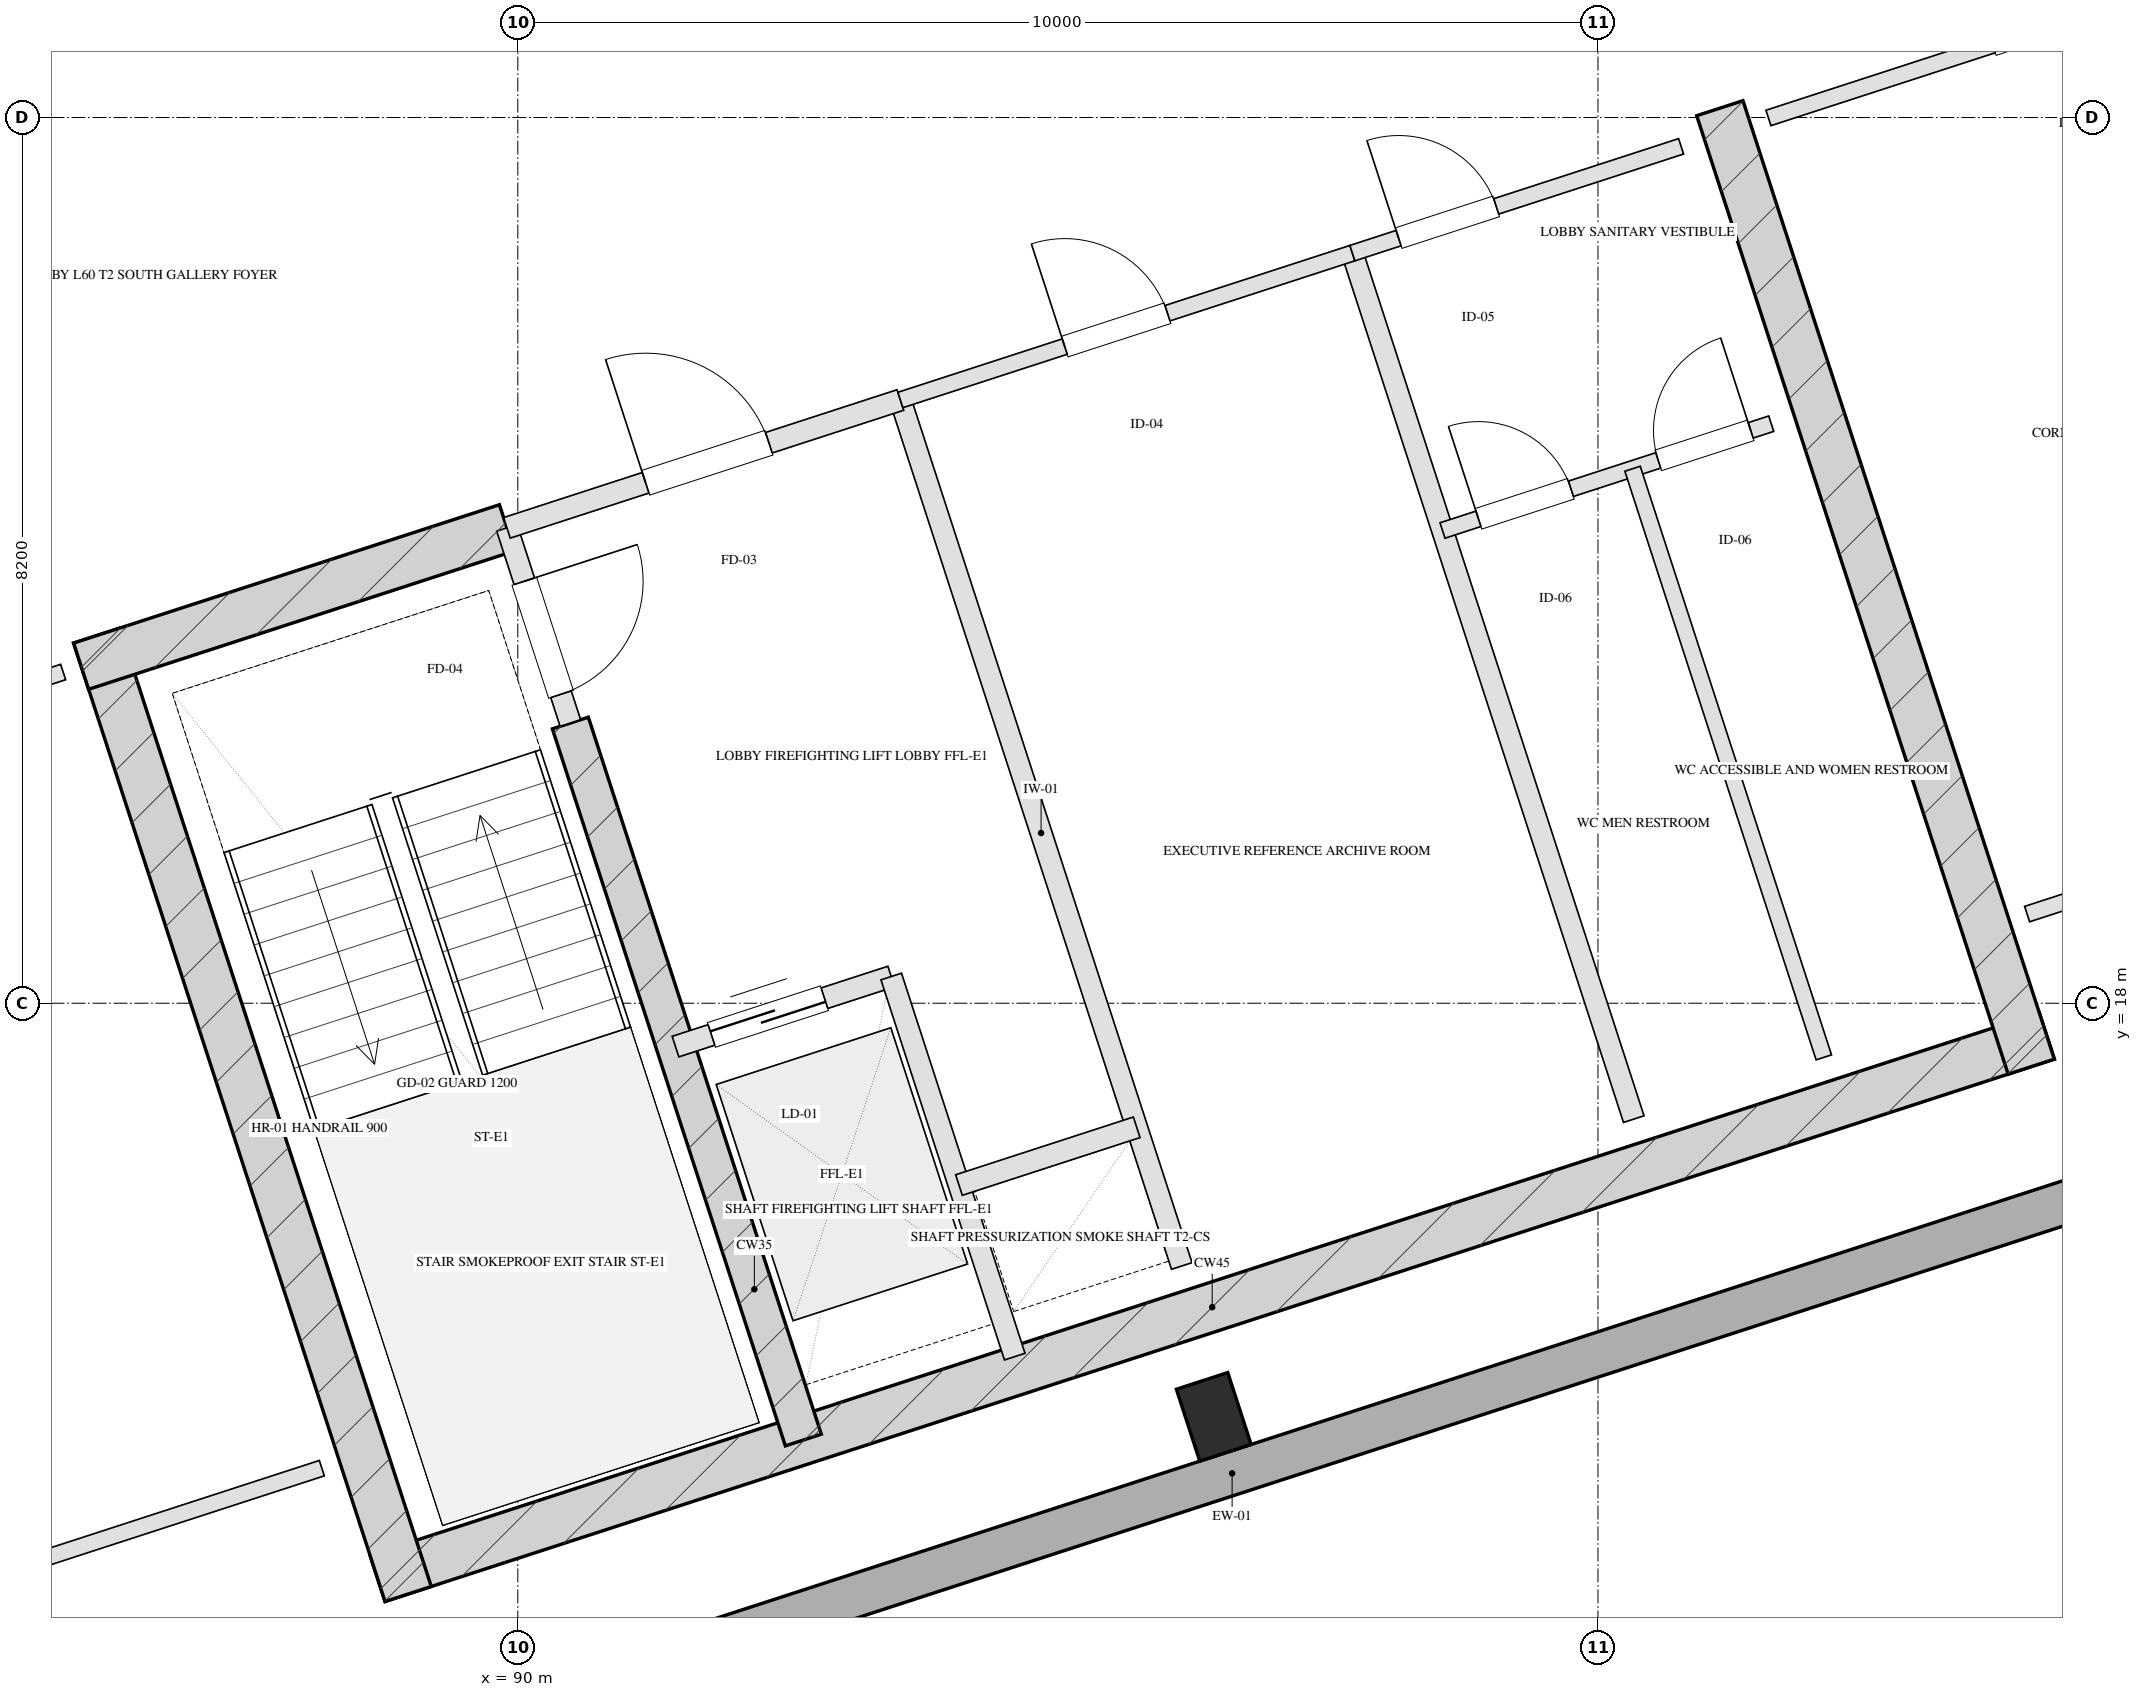
"""IFC4 building model, lengths in metres.
Left out: names, types, materials, properties, quantities, classifications, styles, units other than length and angle.
Written with IfcOpenShell. Run it as: python <this file> out.ifc"""

import sys

from ifc_helpers import new_model, si_unit, direction, frame, frame_2d, origin, origin_2d, place, context, subcontext, project, spatial, rectangle, hollow_rectangle, extrude, element, fill, save


model = new_model("IFC4")
c1 = context("Model", 3, precision=1e-05, world=origin(), true_north=direction((0.0, 1.0)))
c2 = subcontext(c1, "Body", "Model", "MODEL_VIEW")
j1 = project(units=[si_unit("LENGTHUNIT", "METRE"), si_unit("PLANEANGLEUNIT", "RADIAN")], contexts=[c1])
p1 = place(None, origin())
s1 = spatial("IfcSite", under=j1, at=p1, CompositionType="ELEMENT")
p2 = place(p1, origin())
s2 = spatial("IfcBuilding", under=s1, at=p2, CompositionType="ELEMENT")
p3 = place(p2, frame((0.0, 0.0, 223.1)))
s3 = spatial("IfcBuildingStorey", under=s2, at=p3, CompositionType="ELEMENT", Elevation=223.1)
p4 = place(p3, frame((88.701, 12.675, 0.0), z_axis=(0.0, 0.0, 1.0), x_axis=(0.95105824505, 0.309011673763, 0.0)))
e1 = element("IfcWall", 1, at=p4, inside=s3, PredefinedType="SHEAR", context=c2, shape_type="SweptSolid", body=[
    extrude(rectangle(XDim=16.25, YDim=0.45, at=frame_2d((8.125, 0.0))), origin(), (0.0, 0.0, 1.0), 3.45),
])
for number, where, z_axis, x_axis in (
    (2, (86.102, 21.404, 0.0), (0.0, 0.0, 1.0), (0.309, -0.951, 0.0)),
    (3, (101.128, 26.286, 0.0), (0.0, 0.0, 1.0), (0.309, -0.951, 0.0)),
):
    element("IfcWall", number, at=place(p3, frame(where, z_axis=z_axis, x_axis=x_axis)), inside=s3, PredefinedType="SHEAR", context=c2, shape_type="SweptSolid", body=[
        extrude(rectangle(XDim=9.33, YDim=0.45, at=frame_2d((4.665, 0.0))), origin(), (0.0, 0.0, 1.0), 3.45),
    ])
p5 = place(p3, frame((90.486, 20.594, 0.0), z_axis=(0.0, 0.0, 1.0), x_axis=(0.309020428229, -0.951055400562, 0.0)))
e4 = element("IfcWall", 4, at=p5, inside=s3, PredefinedType="SHEAR", context=c2, shape_type="SweptSolid", body=[
    extrude(rectangle(XDim=6.98, YDim=0.35, at=frame_2d((3.49, 0.0))), origin(), (0.0, 0.0, 1.0), 3.45),
])
p6 = place(p3, frame((85.957, 21.12, 0.0), z_axis=(0.0, 0.0, 1.0), x_axis=(0.951064796122, 0.308991510526, 0.0)))
e5 = element("IfcWall", 5, at=p6, inside=s3, PredefinedType="SHEAR", context=c2, shape_type="SweptSolid", body=[
    extrude(rectangle(XDim=4.145, YDim=0.45, at=frame_2d((2.073, 0.0))), origin(), (0.0, 0.0, 1.0), 3.45),
])
p7 = place(p3, frame((96.443, 14.17, 0.0), z_axis=(0.0, 0.0, 1.0), x_axis=(0.951056516295, 0.309016994375, 0.0)))
e6 = element("IfcColumn", 6, at=p7, inside=s3, PredefinedType="COLUMN", context=c2, shape_type="SweptSolid", body=[
    extrude(hollow_rectangle(XDim=0.5, YDim=0.7, WallThickness=0.025, at=origin_2d()), origin(), (0.0, 0.0, 1.0), 3.451),
])
p8 = place(p3, frame((97.382, 56.586, 0.0), z_axis=(0.0, 0.0, 1.0), x_axis=(0.309016491071, -0.951056679828, 0.0)))
e7 = element("IfcWall", 7, at=p8, inside=s3, PredefinedType="SOLIDWALL", context=c2, shape_type="SweptSolid", body=[
    extrude(rectangle(XDim=38.4, YDim=0.4, at=frame_2d((19.2, 0.0))), origin(), (0.0, 0.0, 1.0), 2.61),
])
p9 = place(p8, frame((24.55, 0.0, 0.75)))
e8 = element("IfcOpeningElement", 8, at=p9, cuts=e7, PredefinedType="OPENING", context=c2, shape_type="SweptSolid", body=[
    extrude(rectangle(XDim=2.1, YDim=1.46, at=frame_2d((1.05, 0.73))), frame((0.0, 0.21, 0.0), z_axis=(0.0, -1.0, 0.0), x_axis=(1.0, 0.0, 0.0)), (0.0, 0.0, 1.0), 0.42),
])
p10 = place(p8, frame((20.75, 0.0, 0.75)))
e9 = element("IfcOpeningElement", 9, at=p10, cuts=e7, PredefinedType="OPENING", context=c2, shape_type="SweptSolid", body=[
    extrude(rectangle(XDim=2.1, YDim=1.46, at=frame_2d((1.05, 0.73))), frame((0.0, 0.21, 0.0), z_axis=(0.0, -1.0, 0.0), x_axis=(1.0, 0.0, 0.0)), (0.0, 0.0, 1.0), 0.42),
])
p11 = place(p8, frame((15.55, 0.0, 0.75)))
e10 = element("IfcOpeningElement", 10, at=p11, cuts=e7, PredefinedType="OPENING", context=c2, shape_type="SweptSolid", body=[
    extrude(rectangle(XDim=2.1, YDim=1.46, at=frame_2d((1.05, 0.73))), frame((0.0, 0.21, 0.0), z_axis=(0.0, -1.0, 0.0), x_axis=(1.0, 0.0, 0.0)), (0.0, 0.0, 1.0), 0.42),
])
p12 = place(p8, frame((11.75, 0.0, 0.75)))
e11 = element("IfcOpeningElement", 11, at=p12, cuts=e7, PredefinedType="OPENING", context=c2, shape_type="SweptSolid", body=[
    extrude(rectangle(XDim=2.1, YDim=1.46, at=frame_2d((1.05, 0.73))), frame((0.0, 0.21, 0.0), z_axis=(0.0, -1.0, 0.0), x_axis=(1.0, 0.0, 0.0)), (0.0, 0.0, 1.0), 0.42),
])
p13 = place(p3, frame((107.835, 17.294, 0.0), z_axis=(0.0, 0.0, 1.0), x_axis=(-0.951058012937, -0.309012388148, 0.0)))
e12 = element("IfcWall", 12, at=p13, inside=s3, PredefinedType="SOLIDWALL", context=c2, shape_type="SweptSolid", body=[
    extrude(rectangle(XDim=23.6, YDim=0.4, at=frame_2d((11.8, 0.0))), origin(), (0.0, 0.0, 1.0), 2.61),
])
p14 = place(p3, frame((89.899, 22.401, 0.0), z_axis=(0.0, 0.0, 1.0), x_axis=(0.308932062672, -0.951084108086, 0.0)))
e13 = element("IfcWall", 13, at=p14, inside=s3, PredefinedType="PARTITIONING", context=c2, shape_type="SweptSolid", body=[
    extrude(rectangle(XDim=1.9, YDim=0.2, at=frame_2d((0.95, 0.0))), origin(), (0.0, 0.0, 1.0), 3.175),
])
p15 = place(p14, frame((0.52, 0.0, 0.0)))
e14 = element("IfcOpeningElement", 14, at=p15, cuts=e13, PredefinedType="OPENING", context=c2, shape_type="SweptSolid", body=[
    extrude(rectangle(XDim=1.1, YDim=2.05, at=frame_2d((0.55, 1.025))), frame((0.0, 0.11, 0.0), z_axis=(0.0, -1.0, 0.0), x_axis=(1.0, 0.0, 0.0)), (0.0, 0.0, 1.0), 0.22),
])
p16 = place(p3, frame((93.542, 23.585, 0.0), z_axis=(0.0, 0.0, 1.0), x_axis=(0.309042196757, -0.951048327176, 0.0)))
e15 = element("IfcWall", 15, at=p16, inside=s3, PredefinedType="PARTITIONING", context=c2, shape_type="SweptSolid", body=[
    extrude(rectangle(XDim=8.43, YDim=0.2, at=frame_2d((4.215, 0.0))), origin(), (0.0, 0.0, 1.0), 3.175),
])
p17 = place(p3, frame((89.899, 22.401, 0.0), z_axis=(0.0, 0.0, 1.0), x_axis=(0.951046716504, 0.309047153403, 0.0)))
e16 = element("IfcWall", 16, at=p17, inside=s3, PredefinedType="PARTITIONING", context=c2, shape_type="SweptSolid", body=[
    extrude(rectangle(XDim=3.83, YDim=0.2, at=frame_2d((1.915, 0.0))), origin(), (0.0, 0.0, 1.0), 3.175),
])
p18 = place(p17, frame((1.35, 0.0, 0.0)))
e17 = element("IfcOpeningElement", 17, at=p18, cuts=e16, PredefinedType="OPENING", context=c2, shape_type="SweptSolid", body=[
    extrude(rectangle(XDim=1.2, YDim=2.05, at=frame_2d((0.6, 1.025))), frame((0.0, 0.11, 0.0), z_axis=(0.0, -1.0, 0.0), x_axis=(1.0, 0.0, 0.0)), (0.0, 0.0, 1.0), 0.22),
])
p19 = place(p3, frame((91.46, 17.598, 0.0), z_axis=(0.0, 0.0, 1.0), x_axis=(0.951062257173, 0.308999325213, 0.0)))
e18 = element("IfcWall", 18, at=p19, inside=s3, PredefinedType="PARTITIONING", context=c2, shape_type="SweptSolid", body=[
    extrude(rectangle(XDim=2.1, YDim=0.2, at=frame_2d((1.05, 0.0))), origin(), (0.0, 0.0, 1.0), 3.175),
])
p20 = place(p19, frame((0.35, 0.0, 0.0)))
e19 = element("IfcOpeningElement", 19, at=p20, cuts=e18, PredefinedType="OPENING", context=c2, shape_type="SweptSolid", body=[
    extrude(rectangle(XDim=1.1, YDim=2.05, at=frame_2d((0.55, 1.025))), frame((0.0, 0.11, 0.0), z_axis=(0.0, -1.0, 0.0), x_axis=(1.0, 0.0, 0.0)), (0.0, 0.0, 1.0), 0.22),
])
p21 = place(p3, frame((93.457, 18.247, 0.0), z_axis=(0.0, 0.0, 1.0), x_axis=(0.3089935693, -0.951064127245, 0.0)))
e20 = element("IfcWall", 20, at=p21, inside=s3, PredefinedType="PARTITIONING", context=c2, shape_type="SweptSolid", body=[
    extrude(rectangle(XDim=3.7, YDim=0.2, at=frame_2d((1.85, 0.0))), origin(), (0.0, 0.0, 1.0), 3.175),
])
p22 = place(p3, frame((94.084, 16.317, 0.0), z_axis=(0.0, 0.0, 1.0), x_axis=(0.951041328149, 0.309063734775, 0.0)))
e21 = element("IfcWall", 21, at=p22, inside=s3, PredefinedType="PARTITIONING", context=c2, shape_type="SweptSolid", body=[
    extrude(rectangle(XDim=1.73, YDim=0.2, at=frame_2d((0.865, 0.0))), origin(), (0.0, 0.0, 1.0), 3.175),
])
p23 = place(p3, frame((97.727, 24.944, 0.0), z_axis=(0.0, 0.0, 1.0), x_axis=(0.309016001439, -0.951056838919, 0.0)))
e22 = element("IfcWall", 22, at=p23, inside=s3, PredefinedType="PARTITIONING", context=c2, shape_type="SweptSolid", body=[
    extrude(rectangle(XDim=8.43, YDim=0.2, at=frame_2d((4.215, 0.0))), origin(), (0.0, 0.0, 1.0), 3.175),
])
p24 = place(p3, frame((93.542, 23.585, 0.0), z_axis=(0.0, 0.0, 1.0), x_axis=(0.951063829732, 0.308994485023, 0.0)))
e23 = element("IfcWall", 23, at=p24, inside=s3, PredefinedType="PARTITIONING", context=c2, shape_type="SweptSolid", body=[
    extrude(rectangle(XDim=4.4, YDim=0.15, at=frame_2d((2.2, 0.0))), origin(), (0.0, 0.0, 1.0), 3.175),
])
p25 = place(p24, frame((1.6, 0.0, 0.0)))
e24 = element("IfcOpeningElement", 24, at=p25, cuts=e23, PredefinedType="OPENING", context=c2, shape_type="SweptSolid", body=[
    extrude(rectangle(XDim=1.0, YDim=2.05, at=frame_2d((0.5, 1.025))), frame((0.0, 0.085, 0.0), z_axis=(0.0, -1.0, 0.0), x_axis=(1.0, 0.0, 0.0)), (0.0, 0.0, 1.0), 0.17),
])
p26 = place(p3, frame((97.727, 24.944, 0.0), z_axis=(0.0, 0.0, 1.0), x_axis=(0.951036872128, 0.309077446369, 0.0)))
e25 = element("IfcWall", 25, at=p26, inside=s3, PredefinedType="PARTITIONING", context=c2, shape_type="SweptSolid", body=[
    extrude(rectangle(XDim=3.2, YDim=0.15, at=frame_2d((1.6, 0.0))), origin(), (0.0, 0.0, 1.0), 3.175),
])
p27 = place(p26, frame((0.45, 0.0, 0.0)))
e26 = element("IfcOpeningElement", 26, at=p27, cuts=e25, PredefinedType="OPENING", context=c2, shape_type="SweptSolid", body=[
    extrude(rectangle(XDim=0.95, YDim=2.05, at=frame_2d((0.475, 1.025))), frame((0.0, 0.085, 0.0), z_axis=(0.0, -1.0, 0.0), x_axis=(1.0, 0.0, 0.0)), (0.0, 0.0, 1.0), 0.17),
])
p28 = place(p3, frame((98.561, 22.376, 0.0), z_axis=(0.0, 0.0, 1.0), x_axis=(0.95104415986, 0.309055020985, 0.0)))
e27 = element("IfcWall", 27, at=p28, inside=s3, PredefinedType="PARTITIONING", context=c2, shape_type="SweptSolid", body=[
    extrude(rectangle(XDim=3.2, YDim=0.15, at=frame_2d((1.6, 0.0))), origin(), (0.0, 0.0, 1.0), 3.175),
])
p29 = place(p28, frame((0.35, 0.0, 0.0)))
e28 = element("IfcOpeningElement", 28, at=p29, cuts=e27, PredefinedType="OPENING", context=c2, shape_type="SweptSolid", body=[
    extrude(rectangle(XDim=0.9, YDim=2.05, at=frame_2d((0.45, 1.025))), frame((0.0, 0.085, 0.0), z_axis=(0.0, -1.0, 0.0), x_axis=(1.0, 0.0, 0.0)), (0.0, 0.0, 1.0), 0.17),
])
p30 = place(p28, frame((2.1, 0.0, 0.0)))
e29 = element("IfcOpeningElement", 29, at=p30, cuts=e27, PredefinedType="OPENING", context=c2, shape_type="SweptSolid", body=[
    extrude(rectangle(XDim=0.9, YDim=2.05, at=frame_2d((0.45, 1.025))), frame((0.0, 0.085, 0.0), z_axis=(0.0, -1.0, 0.0), x_axis=(1.0, 0.0, 0.0)), (0.0, 0.0, 1.0), 0.17),
])
p31 = place(p3, frame((100.32, 22.948, 0.0), z_axis=(0.0, 0.0, 1.0), x_axis=(0.309035009867, -0.951050662518, 0.0)))
e30 = element("IfcWall", 30, at=p31, inside=s3, PredefinedType="PARTITIONING", context=c2, shape_type="SweptSolid", body=[
    extrude(rectangle(XDim=5.73, YDim=0.15, at=frame_2d((2.865, 0.0))), origin(), (0.0, 0.0, 1.0), 3.175),
])
p32 = place(p3, frame((82.669, 11.903, 0.0), z_axis=(0.0, 0.0, 1.0), x_axis=(0.951059431056, 0.309008023519, 0.0)))
e31 = element("IfcWall", 31, at=p32, inside=s3, PredefinedType="PARTITIONING", context=c2, shape_type="SweptSolid", body=[
    extrude(rectangle(XDim=5.8, YDim=0.15, at=frame_2d((2.9, 0.0))), origin(), (0.0, 0.0, 1.0), 3.175),
])
p33 = place(p3, frame((80.275, 19.274, 0.0), z_axis=(0.0, 0.0, 1.0), x_axis=(0.951059431056, 0.309008023519, 0.0)))
e32 = element("IfcWall", 32, at=p33, inside=s3, PredefinedType="PARTITIONING", context=c2, shape_type="SweptSolid", body=[
    extrude(rectangle(XDim=5.8, YDim=0.15, at=frame_2d((2.9, 0.0))), origin(), (0.0, 0.0, 1.0), 3.175),
])
p34 = place(p33, frame((2.436, 0.0, 0.0)))
e33 = element("IfcOpeningElement", 33, at=p34, cuts=e32, PredefinedType="OPENING", context=c2, shape_type="SweptSolid", body=[
    extrude(rectangle(XDim=1.0, YDim=2.05, at=frame_2d((0.5, 1.025))), frame((0.0, 0.085, 0.0), z_axis=(0.0, -1.0, 0.0), x_axis=(1.0, 0.0, 0.0)), (0.0, 0.0, 1.0), 0.17),
])
p35 = place(p3, frame((103.973, 18.825, 0.0), z_axis=(0.0, 0.0, 1.0), x_axis=(0.951055112834, 0.309021313752, 0.0)))
e34 = element("IfcWall", 34, at=p35, inside=s3, PredefinedType="PARTITIONING", context=c2, shape_type="SweptSolid", body=[
    extrude(rectangle(XDim=5.2, YDim=0.15, at=frame_2d((2.6, 0.0))), origin(), (0.0, 0.0, 1.0), 3.175),
])
p36 = place(p3, frame((101.578, 26.196, 0.0), z_axis=(0.0, 0.0, 1.0), x_axis=(0.951064427824, 0.308992644131, 0.0)))
e35 = element("IfcWall", 35, at=p36, inside=s3, PredefinedType="PARTITIONING", context=c2, shape_type="SweptSolid", body=[
    extrude(rectangle(XDim=5.2, YDim=0.15, at=frame_2d((2.6, 0.0))), origin(), (0.0, 0.0, 1.0), 3.175),
])
p37 = place(p36, frame((2.184, 0.0, 0.0)))
e36 = element("IfcOpeningElement", 36, at=p37, cuts=e35, PredefinedType="OPENING", context=c2, shape_type="SweptSolid", body=[
    extrude(rectangle(XDim=1.0, YDim=2.05, at=frame_2d((0.5, 1.025))), frame((0.0, 0.085, 0.0), z_axis=(0.0, -1.0, 0.0), x_axis=(1.0, 0.0, 0.0)), (0.0, 0.0, 1.0), 0.17),
])
p38 = place(p3, frame((78.266, 25.456, 0.0), z_axis=(0.0, 0.0, 1.0), x_axis=(0.951056617779, 0.30901668204, 0.0)))
e37 = element("IfcWall", 37, at=p38, inside=s3, PredefinedType="PARTITIONING", context=c2, shape_type="SweptSolid", body=[
    extrude(rectangle(XDim=15.275, YDim=0.15, at=frame_2d((7.637, 0.0))), origin(), (0.0, 0.0, 1.0), 3.175),
])
p39 = place(p38, frame((4.6, 0.0, 0.0)))
e38 = element("IfcOpeningElement", 38, at=p39, cuts=e37, PredefinedType="OPENING", context=c2, shape_type="SweptSolid", body=[
    extrude(rectangle(XDim=1.0, YDim=2.05, at=frame_2d((0.5, 1.025))), frame((0.0, 0.085, 0.0), z_axis=(0.0, -1.0, 0.0), x_axis=(1.0, 0.0, 0.0)), (0.0, 0.0, 1.0), 0.17),
])
p40 = place(p15, origin())
e39 = element("IfcDoor", 39, at=p40, inside=s3, OperationType="SINGLE_SWING_LEFT", PredefinedType="DOOR", context=c2, shape_type="SweptSolid", body=[
    extrude(rectangle(XDim=1.1, YDim=2.05, at=frame_2d((0.55, 1.025))), frame((0.0, 0.025, 0.0), z_axis=(0.0, -1.0, 0.0), x_axis=(1.0, 0.0, 0.0)), (0.0, 0.0, 1.0), 0.05),
])
fill(e14, e39)
p41 = place(p18, origin())
e40 = element("IfcDoor", 40, at=p41, inside=s3, OperationType="SINGLE_SWING_LEFT", PredefinedType="DOOR", context=c2, shape_type="SweptSolid", body=[
    extrude(rectangle(XDim=1.2, YDim=2.05, at=frame_2d((0.6, 1.025))), frame((0.0, 0.025, 0.0), z_axis=(0.0, -1.0, 0.0), x_axis=(1.0, 0.0, 0.0)), (0.0, 0.0, 1.0), 0.05),
])
fill(e17, e40)
p42 = place(p20, origin())
e41 = element("IfcDoor", 41, at=p42, inside=s3, OperationType="DOUBLE_DOOR_SLIDING", PredefinedType="DOOR", context=c2, shape_type="SweptSolid", body=[
    extrude(rectangle(XDim=1.1, YDim=2.05, at=frame_2d((0.55, 1.025))), frame((0.0, 0.025, 0.0), z_axis=(0.0, -1.0, 0.0), x_axis=(1.0, 0.0, 0.0)), (0.0, 0.0, 1.0), 0.05),
])
fill(e19, e41)
p43 = place(p25, origin())
e42 = element("IfcDoor", 42, at=p43, inside=s3, OperationType="SINGLE_SWING_LEFT", PredefinedType="DOOR", context=c2, shape_type="SweptSolid", body=[
    extrude(rectangle(XDim=1.0, YDim=2.05, at=frame_2d((0.5, 1.025))), frame((0.0, 0.025, 0.0), z_axis=(0.0, -1.0, 0.0), x_axis=(1.0, 0.0, 0.0)), (0.0, 0.0, 1.0), 0.05),
])
fill(e24, e42)
p44 = place(p27, origin())
e43 = element("IfcDoor", 43, at=p44, inside=s3, OperationType="SINGLE_SWING_LEFT", PredefinedType="DOOR", context=c2, shape_type="SweptSolid", body=[
    extrude(rectangle(XDim=0.95, YDim=2.05, at=frame_2d((0.475, 1.025))), frame((0.0, 0.025, 0.0), z_axis=(0.0, -1.0, 0.0), x_axis=(1.0, 0.0, 0.0)), (0.0, 0.0, 1.0), 0.05),
])
fill(e26, e43)
p45 = place(p29, origin())
e44 = element("IfcDoor", 44, at=p45, inside=s3, OperationType="SINGLE_SWING_LEFT", PredefinedType="DOOR", context=c2, shape_type="SweptSolid", body=[
    extrude(rectangle(XDim=0.9, YDim=2.05, at=frame_2d((0.45, 1.025))), frame((0.0, 0.025, 0.0), z_axis=(0.0, -1.0, 0.0), x_axis=(1.0, 0.0, 0.0)), (0.0, 0.0, 1.0), 0.05),
])
fill(e28, e44)
p46 = place(p30, origin())
e45 = element("IfcDoor", 45, at=p46, inside=s3, OperationType="SINGLE_SWING_RIGHT", PredefinedType="DOOR", context=c2, shape_type="SweptSolid", body=[
    extrude(rectangle(XDim=0.9, YDim=2.05, at=frame_2d((0.45, 1.025))), frame((0.0, 0.025, 0.0), z_axis=(0.0, -1.0, 0.0), x_axis=(1.0, 0.0, 0.0)), (0.0, 0.0, 1.0), 0.05),
])
fill(e29, e45)
save(model, sys.argv[1])
